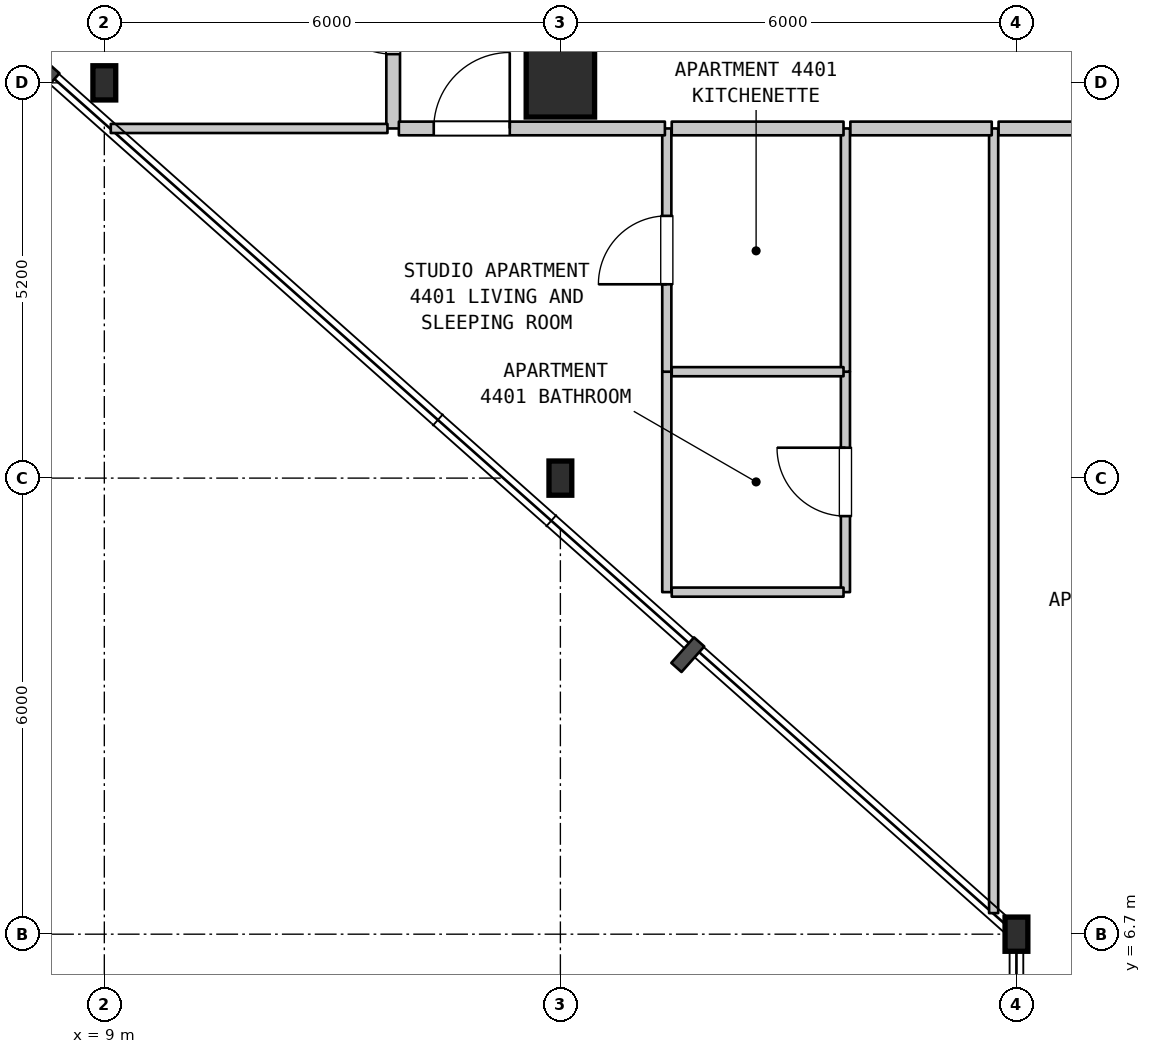
"""IFC4 building model, lengths in metres.
Left out: names, types, materials, properties, quantities, classifications, styles, units other than length and angle.
Written with IfcOpenShell. Run it as: python <this file> out.ifc"""

import sys

from ifc_helpers import new_model, si_unit, direction, frame, frame_2d, origin, origin_2d, place, context, subcontext, project, spatial, rectangle, i_section, extrude, element, fill, save


model = new_model("IFC4")
c1 = context("Model", 3, precision=1e-05, world=origin(), true_north=direction((0.0, 1.0)))
c2 = subcontext(c1, "Body", "Model", "MODEL_VIEW")
j1 = project(units=[si_unit("LENGTHUNIT", "METRE"), si_unit("PLANEANGLEUNIT", "RADIAN")], contexts=[c1])
p1 = place(None, origin())
s1 = spatial("IfcSite", under=j1, at=p1, CompositionType="ELEMENT")
p2 = place(p1, origin())
s2 = spatial("IfcBuilding", under=s1, at=p2, CompositionType="ELEMENT")
p3 = place(p2, frame((0.0, 0.0, 180.2)))
s3 = spatial("IfcBuildingStorey", under=s2, at=p3, CompositionType="ELEMENT", Elevation=180.2)
for number, where, z_axis, x_axis in (
    (1, (9.0, 17.9, 0.0), (0.0, 0.0, 1.0), (1.0, 0.0, 0.0)),
    (2, (15.0, 12.7, 0.0), (0.0, 0.0, 1.0), (1.0, 0.0, 0.0)),
):
    element("IfcColumn", number, at=place(p3, frame(where, z_axis=z_axis, x_axis=x_axis)), inside=s3, PredefinedType="COLUMN", context=c2, shape_type="SweptSolid", body=[
        extrude(i_section(OverallWidth=0.3, OverallDepth=0.45, WebThickness=0.014, FlangeThickness=0.026, FilletRadius=0.027, at=origin_2d()), origin(), (0.0, 0.0, 1.0), 3.7),
    ])
p4 = place(p3, frame((15.0, 17.9, 0.0), z_axis=(0.0, 0.0, 1.0), x_axis=(1.0, 0.0, 0.0)))
e3 = element("IfcColumn", 3, at=p4, inside=s3, PredefinedType="COLUMN", context=c2, shape_type="SweptSolid", body=[
    extrude(rectangle(XDim=0.9, YDim=0.9, at=origin_2d()), origin(), (0.0, 0.0, 1.0), 3.7),
])
p5 = place(p3, frame((21.0, 6.7, 0.0), z_axis=(0.0, 0.0, 1.0), x_axis=(1.0, 0.0, 0.0)))
e4 = element("IfcColumn", 4, at=p5, inside=s3, PredefinedType="COLUMN", context=c2, shape_type="SweptSolid", body=[
    extrude(i_section(OverallWidth=0.3, OverallDepth=0.45, WebThickness=0.014, FlangeThickness=0.026, FilletRadius=0.027, at=origin_2d()), origin(), (0.0, 0.0, 1.0), 3.7),
])
p6 = place(p3, frame((12.8, 17.3, 0.0), z_axis=(0.0, 0.0, 1.0), x_axis=(0.0, 1.0, 0.0)))
e5 = element("IfcWall", 5, at=p6, inside=s3, PredefinedType="STANDARD", context=c2, shape_type="SweptSolid", body=[
    extrude(rectangle(XDim=3.1, YDim=0.18, at=frame_2d((1.55, 0.0))), origin(), (0.0, 0.0, 1.0), 3.38),
])
p7 = place(p6, frame((0.978, 0.0, 0.0)))
e6 = element("IfcOpeningElement", 6, at=p7, cuts=e5, PredefinedType="OPENING", context=c2, shape_type="SweptSolid", body=[
    extrude(rectangle(XDim=1.0, YDim=2.15, at=frame_2d((0.5, 1.075))), frame((0.0, 0.1, 0.0), z_axis=(0.0, -1.0, 0.0), x_axis=(1.0, 0.0, 0.0)), (0.0, 0.0, 1.0), 0.2),
])
p8 = place(p3, frame((16.4, 11.2, 0.0), z_axis=(0.0, 0.0, 1.0), x_axis=(0.0, 1.0, 0.0)))
e7 = element("IfcWall", 7, at=p8, inside=s3, PredefinedType="PARTITIONING", context=c2, shape_type="SweptSolid", body=[
    extrude(rectangle(XDim=2.9, YDim=0.12, at=frame_2d((1.45, 0.0))), origin(), (0.0, 0.0, 1.0), 3.38),
])
p9 = place(p3, frame((16.4, 14.1, 0.0), z_axis=(0.0, 0.0, 1.0), x_axis=(0.0, 1.0, 0.0)))
e8 = element("IfcWall", 8, at=p9, inside=s3, PredefinedType="PARTITIONING", context=c2, shape_type="SweptSolid", body=[
    extrude(rectangle(XDim=3.2, YDim=0.12, at=frame_2d((1.6, 0.0))), origin(), (0.0, 0.0, 1.0), 3.38),
])
p10 = place(p9, frame((1.15, 0.0, 0.0)))
e9 = element("IfcOpeningElement", 9, at=p10, cuts=e8, PredefinedType="OPENING", context=c2, shape_type="SweptSolid", body=[
    extrude(rectangle(XDim=0.9, YDim=2.15, at=frame_2d((0.45, 1.075))), frame((0.0, 0.07, 0.0), z_axis=(0.0, -1.0, 0.0), x_axis=(1.0, 0.0, 0.0)), (0.0, 0.0, 1.0), 0.14),
])
p11 = place(p3, frame((18.75, 11.2, 0.0), z_axis=(0.0, 0.0, 1.0), x_axis=(0.0, 1.0, 0.0)))
e10 = element("IfcWall", 10, at=p11, inside=s3, PredefinedType="PARTITIONING", context=c2, shape_type="SweptSolid", body=[
    extrude(rectangle(XDim=2.9, YDim=0.12, at=frame_2d((1.45, 0.0))), origin(), (0.0, 0.0, 1.0), 3.38),
])
p12 = place(p11, frame((1.0, 0.0, 0.0)))
e11 = element("IfcOpeningElement", 11, at=p12, cuts=e10, PredefinedType="OPENING", context=c2, shape_type="SweptSolid", body=[
    extrude(rectangle(XDim=0.9, YDim=2.1, at=frame_2d((0.45, 1.05))), frame((0.0, 0.07, 0.0), z_axis=(0.0, -1.0, 0.0), x_axis=(1.0, 0.0, 0.0)), (0.0, 0.0, 1.0), 0.14),
])
p13 = place(p3, frame((18.75, 14.1, 0.0), z_axis=(0.0, 0.0, 1.0), x_axis=(0.0, 1.0, 0.0)))
e12 = element("IfcWall", 12, at=p13, inside=s3, PredefinedType="PARTITIONING", context=c2, shape_type="SweptSolid", body=[
    extrude(rectangle(XDim=3.2, YDim=0.12, at=frame_2d((1.6, 0.0))), origin(), (0.0, 0.0, 1.0), 3.38),
])
p14 = place(p3, frame((20.7, 6.977, 0.0), z_axis=(0.0, 0.0, 1.0), x_axis=(0.0, 1.0, 0.0)))
e13 = element("IfcWall", 13, at=p14, inside=s3, PredefinedType="PARTITIONING", context=c2, shape_type="SweptSolid", body=[
    extrude(rectangle(XDim=10.323, YDim=0.12, at=frame_2d((5.162, 0.0))), origin(), (0.0, 0.0, 1.0), 3.38),
])
for number, where, z_axis, x_axis in (
    (14, (16.465, 11.2, 0.0), (0.0, 0.0, 1.0), (1.0, 0.0, 0.0)),
    (15, (16.465, 14.1, 0.0), (0.0, 0.0, 1.0), (1.0, 0.0, 0.0)),
):
    element("IfcWall", number, at=place(p3, frame(where, z_axis=z_axis, x_axis=x_axis)), inside=s3, PredefinedType="PARTITIONING", context=c2, shape_type="SweptSolid", body=[
        extrude(rectangle(XDim=2.26, YDim=0.12, at=frame_2d((1.13, 0.0))), origin(), (0.0, 0.0, 1.0), 3.38),
    ])
p15 = place(p3, frame((9.085, 17.3, 0.0), z_axis=(0.0, 0.0, 1.0), x_axis=(1.0, 0.0, 0.0)))
e16 = element("IfcWall", 16, at=p15, inside=s3, PredefinedType="PARTITIONING", context=c2, shape_type="SweptSolid", body=[
    extrude(rectangle(XDim=3.64, YDim=0.12, at=frame_2d((1.82, 0.0))), origin(), (0.0, 0.0, 1.0), 3.38),
])
p16 = place(p3, frame((12.875, 17.3, 0.0), z_axis=(0.0, 0.0, 1.0), x_axis=(1.0, 0.0, 0.0)))
e17 = element("IfcWall", 17, at=p16, inside=s3, PredefinedType="STANDARD", context=c2, shape_type="SweptSolid", body=[
    extrude(rectangle(XDim=3.5, YDim=0.18, at=frame_2d((1.75, 0.0))), origin(), (0.0, 0.0, 1.0), 3.38),
])
p17 = place(p16, frame((0.459, 0.0, 0.0)))
e18 = element("IfcOpeningElement", 18, at=p17, cuts=e17, PredefinedType="OPENING", context=c2, shape_type="SweptSolid", body=[
    extrude(rectangle(XDim=1.0, YDim=2.15, at=frame_2d((0.5, 1.075))), frame((0.0, 0.1, 0.0), z_axis=(0.0, -1.0, 0.0), x_axis=(1.0, 0.0, 0.0)), (0.0, 0.0, 1.0), 0.2),
])
p18 = place(p3, frame((16.465, 17.3, 0.0), z_axis=(0.0, 0.0, 1.0), x_axis=(1.0, 0.0, 0.0)))
e19 = element("IfcWall", 19, at=p18, inside=s3, PredefinedType="STANDARD", context=c2, shape_type="SweptSolid", body=[
    extrude(rectangle(XDim=2.26, YDim=0.18, at=frame_2d((1.13, 0.0))), origin(), (0.0, 0.0, 1.0), 3.38),
])
p19 = place(p3, frame((18.815, 17.3, 0.0), z_axis=(0.0, 0.0, 1.0), x_axis=(1.0, 0.0, 0.0)))
e20 = element("IfcWall", 20, at=p19, inside=s3, PredefinedType="STANDARD", context=c2, shape_type="SweptSolid", body=[
    extrude(rectangle(XDim=1.86, YDim=0.18, at=frame_2d((0.93, 0.0))), origin(), (0.0, 0.0, 1.0), 3.38),
])
p20 = place(p3, frame((20.765, 17.3, 0.0), z_axis=(0.0, 0.0, 1.0), x_axis=(1.0, 0.0, 0.0)))
e21 = element("IfcWall", 21, at=p20, inside=s3, PredefinedType="STANDARD", context=c2, shape_type="SweptSolid", body=[
    extrude(rectangle(XDim=4.52, YDim=0.18, at=frame_2d((2.26, 0.0))), origin(), (0.0, 0.0, 1.0), 3.38),
])
p21 = place(p20, frame((1.76, 0.0, 0.0)))
e22 = element("IfcOpeningElement", 22, at=p21, cuts=e21, PredefinedType="OPENING", context=c2, shape_type="SweptSolid", body=[
    extrude(rectangle(XDim=1.0, YDim=2.15, at=frame_2d((0.5, 1.075))), frame((0.0, 0.1, 0.0), z_axis=(0.0, -1.0, 0.0), x_axis=(1.0, 0.0, 0.0)), (0.0, 0.0, 1.0), 0.2),
])
p22 = place(p7, origin())
e23 = element("IfcDoor", 23, at=p22, inside=s3, OperationType="SINGLE_SWING_RIGHT", PredefinedType="DOOR", context=c2, shape_type="SweptSolid", body=[
    extrude(rectangle(XDim=1.0, YDim=2.15, at=frame_2d((0.5, 1.075))), frame((0.0, 0.025, 0.0), z_axis=(0.0, -1.0, 0.0), x_axis=(1.0, 0.0, 0.0)), (0.0, 0.0, 1.0), 0.05),
])
fill(e6, e23)
p23 = place(p10, origin())
e24 = element("IfcDoor", 24, at=p23, inside=s3, OperationType="SINGLE_SWING_LEFT", PredefinedType="DOOR", context=c2, shape_type="SweptSolid", body=[
    extrude(rectangle(XDim=0.9, YDim=2.15, at=frame_2d((0.45, 1.075))), frame((0.0, 0.025, 0.0), z_axis=(0.0, -1.0, 0.0), x_axis=(1.0, 0.0, 0.0)), (0.0, 0.0, 1.0), 0.05),
])
fill(e9, e24)
p24 = place(p12, origin())
e25 = element("IfcDoor", 25, at=p24, inside=s3, OperationType="SINGLE_SWING_RIGHT", PredefinedType="DOOR", context=c2, shape_type="SweptSolid", body=[
    extrude(rectangle(XDim=0.9, YDim=2.1, at=frame_2d((0.45, 1.05))), frame((0.0, 0.025, 0.0), z_axis=(0.0, -1.0, 0.0), x_axis=(1.0, 0.0, 0.0)), (0.0, 0.0, 1.0), 0.05),
])
fill(e11, e25)
p25 = place(p17, origin())
e26 = element("IfcDoor", 26, at=p25, inside=s3, OperationType="SINGLE_SWING_RIGHT", PredefinedType="DOOR", context=c2, shape_type="SweptSolid", body=[
    extrude(rectangle(XDim=1.0, YDim=2.15, at=frame_2d((0.5, 1.075))), frame((0.0, 0.025, 0.0), z_axis=(0.0, -1.0, 0.0), x_axis=(1.0, 0.0, 0.0)), (0.0, 0.0, 1.0), 0.05),
])
fill(e18, e26)
save(model, sys.argv[1])
